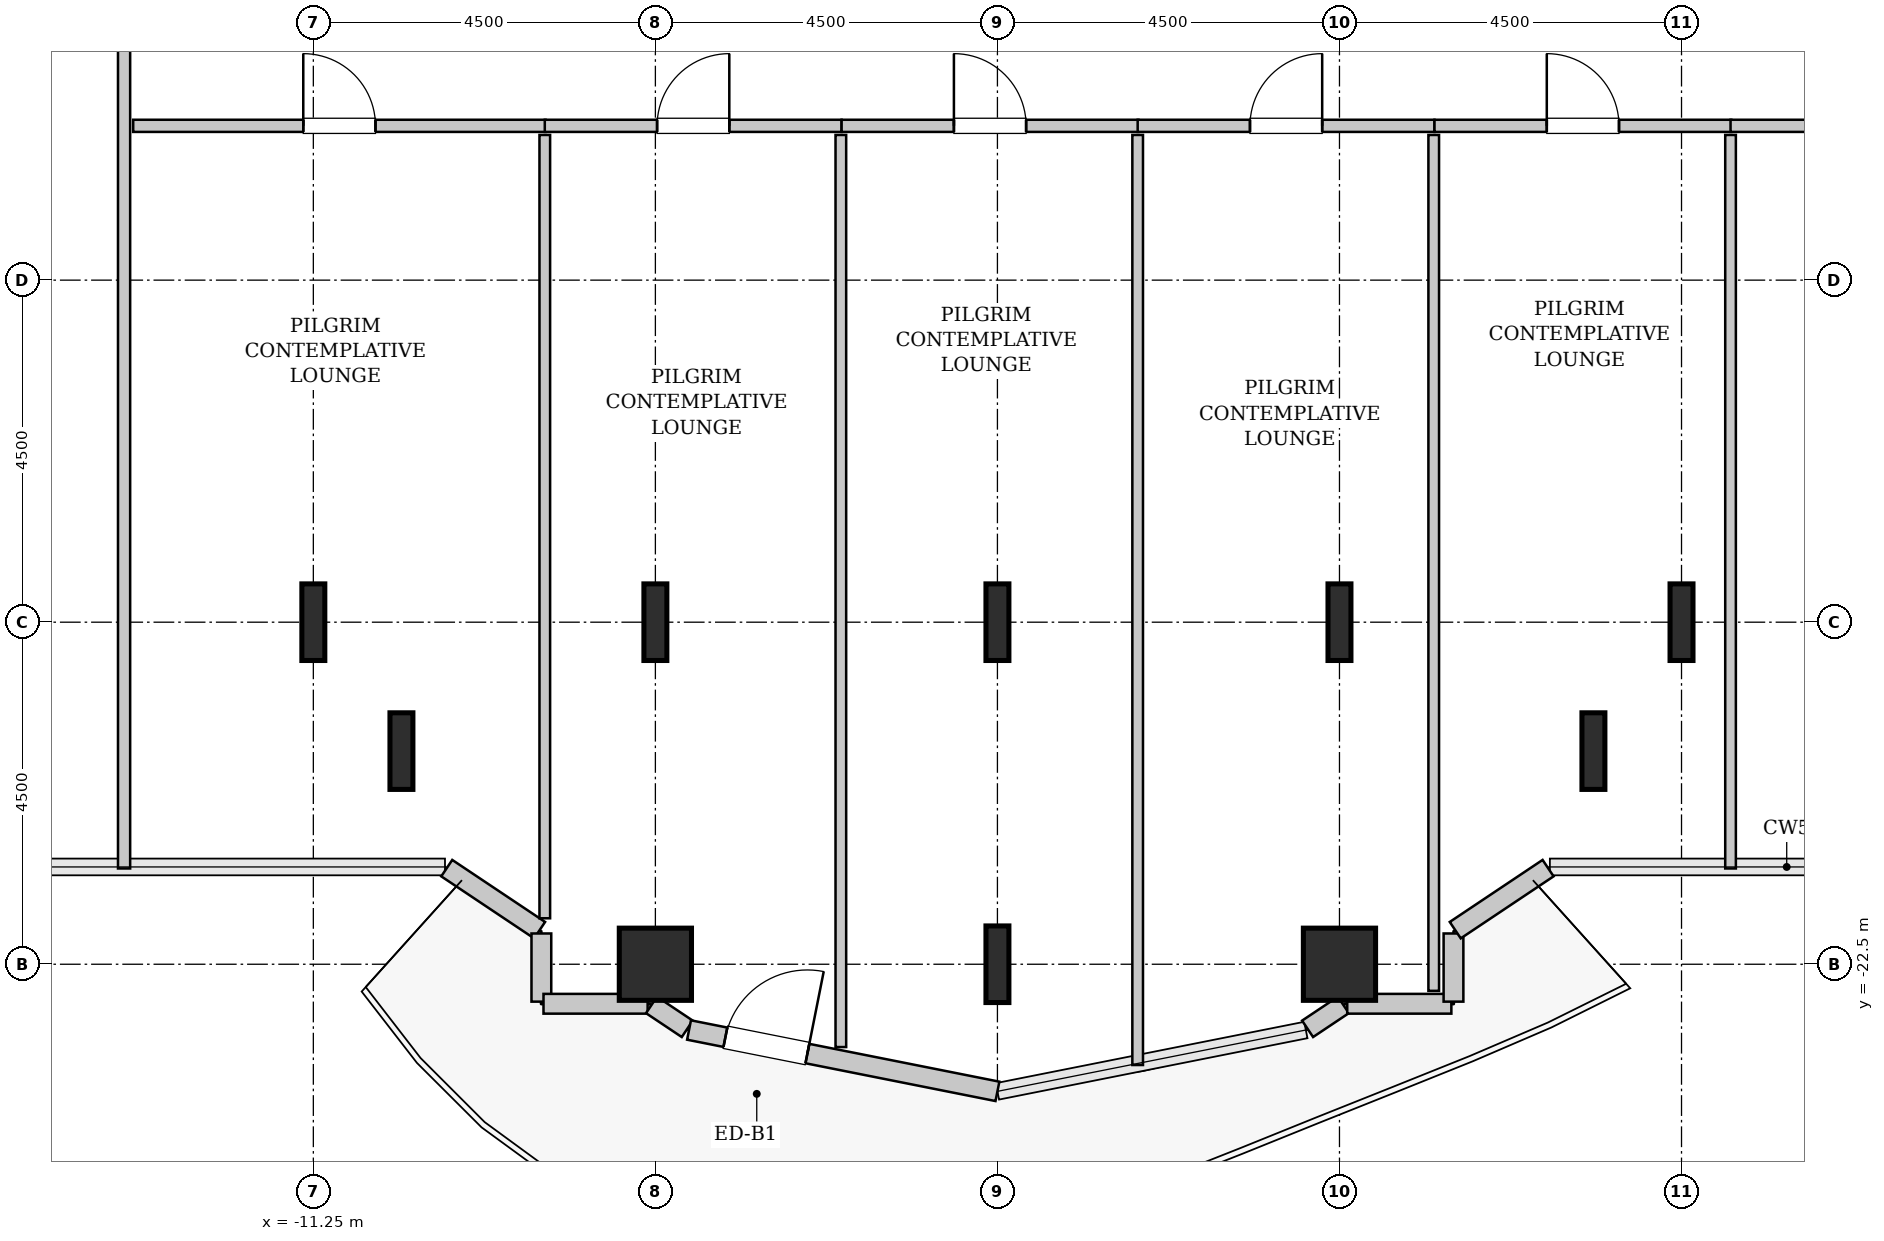
"""IFC4 building model, lengths in metres.
Left out: names, types, materials, properties, quantities, classifications, styles, units other than length and angle.
Written with IfcOpenShell. Run it as: python <this file> out.ifc"""

import sys

from ifc_helpers import new_model, si_unit, direction, frame, frame_2d, origin, origin_2d, place, context, subcontext, project, spatial, rectangle, hollow_rectangle, i_section, extrude, source, transform, mapped, element, fill, save


model = new_model("IFC4")
c1 = context("Model", 3, precision=1e-05, world=origin(), true_north=direction((0.0, 1.0)))
c2 = subcontext(c1, "Body", "Model", "MODEL_VIEW")
j1 = project(units=[si_unit("LENGTHUNIT", "METRE"), si_unit("PLANEANGLEUNIT", "RADIAN")], contexts=[c1])
p1 = place(None, origin())
s1 = spatial("IfcSite", under=j1, at=p1, CompositionType="ELEMENT")
p2 = place(p1, origin())
s2 = spatial("IfcBuilding", under=s1, at=p2, CompositionType="ELEMENT")
p3 = place(p2, frame((0.0, 0.0, 90.8)))
s3 = spatial("IfcBuildingStorey", under=s2, at=p3, CompositionType="ELEMENT", Elevation=90.8)
m1 = source(origin(), c2, "Body", "SweptSolid", [
    extrude(i_section(OverallWidth=0.302, OverallDepth=1.008, WebThickness=0.021, FlangeThickness=0.04, FilletRadius=0.03, at=origin_2d()), origin(), (0.0, 0.0, 1.0), 3.8),
])
for number, where, z_axis, x_axis in (
    (1, (-11.25, -18.0, 0.0), (0.0, 0.0, 1.0), (1.0, 0.0, 0.0)),
    (2, (-10.091, -19.696, 0.0), (0.0, 0.0, 1.0), (1.0, 0.0, 0.0)),
):
    element("IfcColumn", number, at=place(p3, frame(where, z_axis=z_axis, x_axis=x_axis)), inside=s3, PredefinedType="COLUMN", context=c2, shape_type="MappedRepresentation", body=[
        mapped(m1, transform((0.0, 0.0, 0.0), x_axis=(1.0, 0.0, 0.0), y_axis=(0.0, 1.0, 0.0), z_axis=(0.0, 0.0, 1.0), scale=1.0)),
    ])
m2 = source(origin(), c2, "Body", "SweptSolid", [
    extrude(hollow_rectangle(XDim=0.95, YDim=0.95, WallThickness=0.045, InnerFilletRadius=0.045, OuterFilletRadius=0.09, at=origin_2d()), origin(), (0.0, 0.0, 1.0), 3.8),
])
p4 = place(p3, frame((-6.75, -22.5, 0.0), z_axis=(0.0, 0.0, 1.0), x_axis=(1.0, 0.0, 0.0)))
e3 = element("IfcColumn", 3, at=p4, inside=s3, PredefinedType="COLUMN", context=c2, shape_type="MappedRepresentation", body=[
    mapped(m2, transform((0.0, 0.0, 0.0), x_axis=(1.0, 0.0, 0.0), y_axis=(0.0, 1.0, 0.0), z_axis=(0.0, 0.0, 1.0), scale=1.0)),
])
for number, where, z_axis, x_axis in (
    (4, (-6.75, -18.0, 0.0), (0.0, 0.0, 1.0), (1.0, 0.0, 0.0)),
    (5, (-2.25, -22.5, 0.0), (0.0, 0.0, 1.0), (1.0, 0.0, 0.0)),
    (6, (-2.25, -18.0, 0.0), (0.0, 0.0, 1.0), (1.0, 0.0, 0.0)),
):
    element("IfcColumn", number, at=place(p3, frame(where, z_axis=z_axis, x_axis=x_axis)), inside=s3, PredefinedType="COLUMN", context=c2, shape_type="MappedRepresentation", body=[
        mapped(m1, transform((0.0, 0.0, 0.0), x_axis=(1.0, 0.0, 0.0), y_axis=(0.0, 1.0, 0.0), z_axis=(0.0, 0.0, 1.0), scale=1.0)),
    ])
p5 = place(p3, frame((2.25, -22.5, 0.0), z_axis=(0.0, 0.0, 1.0), x_axis=(1.0, 0.0, 0.0)))
e7 = element("IfcColumn", 7, at=p5, inside=s3, PredefinedType="COLUMN", context=c2, shape_type="MappedRepresentation", body=[
    mapped(m2, transform((0.0, 0.0, 0.0), x_axis=(1.0, 0.0, 0.0), y_axis=(0.0, 1.0, 0.0), z_axis=(0.0, 0.0, 1.0), scale=1.0)),
])
for number, where, z_axis, x_axis in (
    (8, (2.25, -18.0, 0.0), (0.0, 0.0, 1.0), (1.0, 0.0, 0.0)),
    (9, (5.591, -19.696, 0.0), (0.0, 0.0, 1.0), (1.0, 0.0, 0.0)),
    (10, (6.75, -18.0, 0.0), (0.0, 0.0, 1.0), (1.0, 0.0, 0.0)),
):
    element("IfcColumn", number, at=place(p3, frame(where, z_axis=z_axis, x_axis=x_axis)), inside=s3, PredefinedType="COLUMN", context=c2, shape_type="MappedRepresentation", body=[
        mapped(m1, transform((0.0, 0.0, 0.0), x_axis=(1.0, 0.0, 0.0), y_axis=(0.0, 1.0, 0.0), z_axis=(0.0, 0.0, 1.0), scale=1.0)),
    ])
m3 = source(origin(), c2, "Body", "SweptSolid", [
    extrude(rectangle(XDim=1.469, YDim=0.26, at=frame_2d((0.734, 0.0))), origin(), (0.0, 0.0, 1.0), 3.55),
])
p6 = place(p3, frame((-9.495, -21.236, 0.0), z_axis=(0.0, 0.0, 1.0), x_axis=(0.831461760506, -0.555581983884, 0.0)))
e11 = element("IfcWall", 11, at=p6, inside=s3, PredefinedType="SOLIDWALL", context=c2, shape_type="MappedRepresentation", body=[
    mapped(m3, transform((0.0, 0.0, 0.0), x_axis=(1.0, 0.0, 0.0), y_axis=(0.0, 1.0, 0.0), z_axis=(0.0, 0.0, 1.0), scale=1.0)),
])
m4 = source(origin(), c2, "Body", "SweptSolid", [
    extrude(rectangle(XDim=0.897, YDim=0.26, at=frame_2d((0.448, 0.0))), origin(), (0.0, 0.0, 1.0), 3.55),
])
p7 = place(p3, frame((-8.25, -22.095, 0.0), z_axis=(0.0, 0.0, 1.0), x_axis=(0.0, -1.0, 0.0)))
e12 = element("IfcWall", 12, at=p7, inside=s3, PredefinedType="SOLIDWALL", context=c2, shape_type="MappedRepresentation", body=[
    mapped(m4, transform((0.0, 0.0, 0.0), x_axis=(1.0, 0.0, 0.0), y_axis=(0.0, 1.0, 0.0), z_axis=(0.0, 0.0, 1.0), scale=1.0)),
])
m5 = source(origin(), c2, "Body", "SweptSolid", [
    extrude(rectangle(XDim=1.37, YDim=0.26, at=frame_2d((0.685, 0.0))), origin(), (0.0, 0.0, 1.0), 3.55),
])
p8 = place(p3, frame((-8.222, -23.02, 0.0), z_axis=(0.0, 0.0, 1.0), x_axis=(1.0, 0.0, 0.0)))
e13 = element("IfcWall", 13, at=p8, inside=s3, PredefinedType="SOLIDWALL", context=c2, shape_type="MappedRepresentation", body=[
    mapped(m5, transform((0.0, 0.0, 0.0), x_axis=(1.0, 0.0, 0.0), y_axis=(0.0, 1.0, 0.0), z_axis=(0.0, 0.0, 1.0), scale=1.0)),
])
m6 = source(origin(), c2, "Body", "SweptSolid", [
    extrude(rectangle(XDim=0.565, YDim=0.26, at=frame_2d((0.283, 0.0))), origin(), (0.0, 0.0, 1.0), 3.55),
])
p9 = place(p3, frame((-6.801, -23.036, 0.0), z_axis=(0.0, 0.0, 1.0), x_axis=(0.831651492666, -0.555297933317, 0.0)))
e14 = element("IfcWall", 14, at=p9, inside=s3, PredefinedType="SOLIDWALL", context=c2, shape_type="MappedRepresentation", body=[
    mapped(m6, transform((0.0, 0.0, 0.0), x_axis=(1.0, 0.0, 0.0), y_axis=(0.0, 1.0, 0.0), z_axis=(0.0, 0.0, 1.0), scale=1.0)),
])
m7 = source(origin(), c2, "Body", "SweptSolid", [
    extrude(rectangle(XDim=4.137, YDim=0.26, at=frame_2d((2.068, 0.0))), origin(), (0.0, 0.0, 1.0), 3.55),
])
p10 = place(p3, frame((-6.307, -23.365, 0.0), z_axis=(0.0, 0.0, 1.0), x_axis=(0.980782170794, -0.195105954428, 0.0)))
e15 = element("IfcWall", 15, at=p10, inside=s3, PredefinedType="SOLIDWALL", context=c2, shape_type="MappedRepresentation", body=[
    mapped(m7, transform((0.0, 0.0, 0.0), x_axis=(1.0, 0.0, 0.0), y_axis=(0.0, 1.0, 0.0), z_axis=(0.0, 0.0, 1.0), scale=1.0)),
])
p11 = place(p10, frame((0.488, 0.0, 0.0)))
e16 = element("IfcOpeningElement", 16, at=p11, cuts=e15, PredefinedType="OPENING", context=c2, shape_type="SweptSolid", body=[
    extrude(rectangle(XDim=1.1, YDim=2.2, at=frame_2d((0.55, 1.1))), frame((0.0, 0.14, 0.0), z_axis=(0.0, -1.0, 0.0), x_axis=(1.0, 0.0, 0.0)), (0.0, 0.0, 1.0), 0.28),
])
p12 = place(p3, frame((1.831, -23.35, 0.0), z_axis=(0.0, 0.0, 1.0), x_axis=(0.831651492666, 0.555297933317, 0.0)))
e17 = element("IfcWall", 17, at=p12, inside=s3, PredefinedType="SOLIDWALL", context=c2, shape_type="MappedRepresentation", body=[
    mapped(m6, transform((0.0, 0.0, 0.0), x_axis=(1.0, 0.0, 0.0), y_axis=(0.0, 1.0, 0.0), z_axis=(0.0, 0.0, 1.0), scale=1.0)),
])
p13 = place(p3, frame((2.352, -23.02, 0.0), z_axis=(0.0, 0.0, 1.0), x_axis=(1.0, 0.0, 0.0)))
e18 = element("IfcWall", 18, at=p13, inside=s3, PredefinedType="SOLIDWALL", context=c2, shape_type="MappedRepresentation", body=[
    mapped(m5, transform((0.0, 0.0, 0.0), x_axis=(1.0, 0.0, 0.0), y_axis=(0.0, 1.0, 0.0), z_axis=(0.0, 0.0, 1.0), scale=1.0)),
])
p14 = place(p3, frame((3.75, -22.992, 0.0), z_axis=(0.0, 0.0, 1.0), x_axis=(0.0, 1.0, 0.0)))
e19 = element("IfcWall", 19, at=p14, inside=s3, PredefinedType="SOLIDWALL", context=c2, shape_type="MappedRepresentation", body=[
    mapped(m4, transform((0.0, 0.0, 0.0), x_axis=(1.0, 0.0, 0.0), y_axis=(0.0, 1.0, 0.0), z_axis=(0.0, 0.0, 1.0), scale=1.0)),
])
p15 = place(p3, frame((3.773, -22.052, 0.0), z_axis=(0.0, 0.0, 1.0), x_axis=(0.831461760506, 0.555581983884, 0.0)))
e20 = element("IfcWall", 20, at=p15, inside=s3, PredefinedType="SOLIDWALL", context=c2, shape_type="MappedRepresentation", body=[
    mapped(m3, transform((0.0, 0.0, 0.0), x_axis=(1.0, 0.0, 0.0), y_axis=(0.0, 1.0, 0.0), z_axis=(0.0, 0.0, 1.0), scale=1.0)),
])
m8 = source(origin(), c2, "Body", "SweptSolid", [
    extrude(rectangle(XDim=12.845, YDim=0.16, at=frame_2d((6.422, 0.0))), origin(), (0.0, 0.0, 1.0), 3.535),
])
p16 = place(p3, frame((-13.74, -21.24, 0.0), z_axis=(0.0, 0.0, 1.0), x_axis=(0.0, 1.0, 0.0)))
e21 = element("IfcWall", 21, at=p16, inside=s3, PredefinedType="PARTITIONING", context=c2, shape_type="MappedRepresentation", body=[
    mapped(m8, transform((0.0, 0.0, 0.0), x_axis=(1.0, 0.0, 0.0), y_axis=(0.0, 1.0, 0.0), z_axis=(0.0, 0.0, 1.0), scale=1.0)),
])
p17 = place(p16, frame((10.812, 0.0, 0.0)))
e22 = element("IfcOpeningElement", 22, at=p17, cuts=e21, PredefinedType="OPENING", context=c2, shape_type="SweptSolid", body=[
    extrude(rectangle(XDim=0.95, YDim=2.1, at=frame_2d((0.475, 1.05))), frame((0.0, 0.09, 0.0), z_axis=(0.0, -1.0, 0.0), x_axis=(1.0, 0.0, 0.0)), (0.0, 0.0, 1.0), 0.18),
])
m9 = source(origin(), c2, "Body", "SweptSolid", [
    extrude(rectangle(XDim=5.425, YDim=0.16, at=frame_2d((2.712, 0.0))), origin(), (0.0, 0.0, 1.0), 3.535),
])
p18 = place(p3, frame((-13.62, -11.47, 0.0), z_axis=(0.0, 0.0, 1.0), x_axis=(1.0, 0.0, 0.0)))
e23 = element("IfcWall", 23, at=p18, inside=s3, PredefinedType="PARTITIONING", context=c2, shape_type="MappedRepresentation", body=[
    mapped(m9, transform((0.0, 0.0, 0.0), x_axis=(1.0, 0.0, 0.0), y_axis=(0.0, 1.0, 0.0), z_axis=(0.0, 0.0, 1.0), scale=1.0)),
])
p19 = place(p18, frame((2.238, 0.0, 0.0)))
e24 = element("IfcOpeningElement", 24, at=p19, cuts=e23, PredefinedType="OPENING", context=c2, shape_type="SweptSolid", body=[
    extrude(rectangle(XDim=0.95, YDim=2.1, at=frame_2d((0.475, 1.05))), frame((0.0, 0.09, 0.0), z_axis=(0.0, -1.0, 0.0), x_axis=(1.0, 0.0, 0.0)), (0.0, 0.0, 1.0), 0.18),
])
m10 = source(origin(), c2, "Body", "SweptSolid", [
    extrude(rectangle(XDim=10.305, YDim=0.14, at=frame_2d((5.153, 0.0))), origin(), (0.0, 0.0, 1.0), 3.535),
])
p20 = place(p3, frame((-8.205, -21.895, 0.0), z_axis=(0.0, 0.0, 1.0), x_axis=(0.0, 1.0, 0.0)))
e25 = element("IfcWall", 25, at=p20, inside=s3, PredefinedType="PARTITIONING", context=c2, shape_type="MappedRepresentation", body=[
    mapped(m10, transform((0.0, 0.0, 0.0), x_axis=(1.0, 0.0, 0.0), y_axis=(0.0, 1.0, 0.0), z_axis=(0.0, 0.0, 1.0), scale=1.0)),
])
m11 = source(origin(), c2, "Body", "SweptSolid", [
    extrude(rectangle(XDim=3.905, YDim=0.16, at=frame_2d((1.953, 0.0))), origin(), (0.0, 0.0, 1.0), 3.535),
])
p21 = place(p3, frame((-8.205, -11.47, 0.0), z_axis=(0.0, 0.0, 1.0), x_axis=(1.0, 0.0, 0.0)))
e26 = element("IfcWall", 26, at=p21, inside=s3, PredefinedType="PARTITIONING", context=c2, shape_type="MappedRepresentation", body=[
    mapped(m11, transform((0.0, 0.0, 0.0), x_axis=(1.0, 0.0, 0.0), y_axis=(0.0, 1.0, 0.0), z_axis=(0.0, 0.0, 1.0), scale=1.0)),
])
p22 = place(p21, frame((1.478, 0.0, 0.0)))
e27 = element("IfcOpeningElement", 27, at=p22, cuts=e26, PredefinedType="OPENING", context=c2, shape_type="SweptSolid", body=[
    extrude(rectangle(XDim=0.95, YDim=2.1, at=frame_2d((0.475, 1.05))), frame((0.0, 0.09, 0.0), z_axis=(0.0, -1.0, 0.0), x_axis=(1.0, 0.0, 0.0)), (0.0, 0.0, 1.0), 0.18),
])
m12 = source(origin(), c2, "Body", "SweptSolid", [
    extrude(rectangle(XDim=12.0, YDim=0.14, at=frame_2d((6.0, 0.0))), origin(), (0.0, 0.0, 1.0), 3.535),
])
p23 = place(p3, frame((-4.31, -23.59, 0.0), z_axis=(0.0, 0.0, 1.0), x_axis=(0.0, 1.0, 0.0)))
e28 = element("IfcWall", 28, at=p23, inside=s3, PredefinedType="PARTITIONING", context=c2, shape_type="MappedRepresentation", body=[
    mapped(m12, transform((0.0, 0.0, 0.0), x_axis=(1.0, 0.0, 0.0), y_axis=(0.0, 1.0, 0.0), z_axis=(0.0, 0.0, 1.0), scale=1.0)),
])
p24 = place(p3, frame((-4.3, -11.47, 0.0), z_axis=(0.0, 0.0, 1.0), x_axis=(1.0, 0.0, 0.0)))
e29 = element("IfcWall", 29, at=p24, inside=s3, PredefinedType="PARTITIONING", context=c2, shape_type="MappedRepresentation", body=[
    mapped(m11, transform((0.0, 0.0, 0.0), x_axis=(1.0, 0.0, 0.0), y_axis=(0.0, 1.0, 0.0), z_axis=(0.0, 0.0, 1.0), scale=1.0)),
])
p25 = place(p24, frame((1.478, 0.0, 0.0)))
e30 = element("IfcOpeningElement", 30, at=p25, cuts=e29, PredefinedType="OPENING", context=c2, shape_type="SweptSolid", body=[
    extrude(rectangle(XDim=0.95, YDim=2.1, at=frame_2d((0.475, 1.05))), frame((0.0, 0.09, 0.0), z_axis=(0.0, -1.0, 0.0), x_axis=(1.0, 0.0, 0.0)), (0.0, 0.0, 1.0), 0.18),
])
m13 = source(origin(), c2, "Body", "SweptSolid", [
    extrude(rectangle(XDim=12.236, YDim=0.14, at=frame_2d((6.118, 0.0))), origin(), (0.0, 0.0, 1.0), 3.535),
])
p26 = place(p3, frame((-0.405, -23.826, 0.0), z_axis=(0.0, 0.0, 1.0), x_axis=(0.0, 1.0, 0.0)))
e31 = element("IfcWall", 31, at=p26, inside=s3, PredefinedType="PARTITIONING", context=c2, shape_type="MappedRepresentation", body=[
    mapped(m13, transform((0.0, 0.0, 0.0), x_axis=(1.0, 0.0, 0.0), y_axis=(0.0, 1.0, 0.0), z_axis=(0.0, 0.0, 1.0), scale=1.0)),
])
p27 = place(p3, frame((-0.405, -11.47, 0.0), z_axis=(0.0, 0.0, 1.0), x_axis=(1.0, 0.0, 0.0)))
e32 = element("IfcWall", 32, at=p27, inside=s3, PredefinedType="PARTITIONING", context=c2, shape_type="MappedRepresentation", body=[
    mapped(m11, transform((0.0, 0.0, 0.0), x_axis=(1.0, 0.0, 0.0), y_axis=(0.0, 1.0, 0.0), z_axis=(0.0, 0.0, 1.0), scale=1.0)),
])
p28 = place(p27, frame((1.478, 0.0, 0.0)))
e33 = element("IfcOpeningElement", 33, at=p28, cuts=e32, PredefinedType="OPENING", context=c2, shape_type="SweptSolid", body=[
    extrude(rectangle(XDim=0.95, YDim=2.1, at=frame_2d((0.475, 1.05))), frame((0.0, 0.09, 0.0), z_axis=(0.0, -1.0, 0.0), x_axis=(1.0, 0.0, 0.0)), (0.0, 0.0, 1.0), 0.18),
])
m14 = source(origin(), c2, "Body", "SweptSolid", [
    extrude(rectangle(XDim=11.26, YDim=0.14, at=frame_2d((5.63, 0.0))), origin(), (0.0, 0.0, 1.0), 3.535),
])
p29 = place(p3, frame((3.49, -22.85, 0.0), z_axis=(0.0, 0.0, 1.0), x_axis=(0.0, 1.0, 0.0)))
e34 = element("IfcWall", 34, at=p29, inside=s3, PredefinedType="PARTITIONING", context=c2, shape_type="MappedRepresentation", body=[
    mapped(m14, transform((0.0, 0.0, 0.0), x_axis=(1.0, 0.0, 0.0), y_axis=(0.0, 1.0, 0.0), z_axis=(0.0, 0.0, 1.0), scale=1.0)),
])
p30 = place(p3, frame((3.5, -11.47, 0.0), z_axis=(0.0, 0.0, 1.0), x_axis=(1.0, 0.0, 0.0)))
e35 = element("IfcWall", 35, at=p30, inside=s3, PredefinedType="PARTITIONING", context=c2, shape_type="MappedRepresentation", body=[
    mapped(m11, transform((0.0, 0.0, 0.0), x_axis=(1.0, 0.0, 0.0), y_axis=(0.0, 1.0, 0.0), z_axis=(0.0, 0.0, 1.0), scale=1.0)),
])
p31 = place(p30, frame((1.478, 0.0, 0.0)))
e36 = element("IfcOpeningElement", 36, at=p31, cuts=e35, PredefinedType="OPENING", context=c2, shape_type="SweptSolid", body=[
    extrude(rectangle(XDim=0.95, YDim=2.1, at=frame_2d((0.475, 1.05))), frame((0.0, 0.09, 0.0), z_axis=(0.0, -1.0, 0.0), x_axis=(1.0, 0.0, 0.0)), (0.0, 0.0, 1.0), 0.18),
])
m15 = source(origin(), c2, "Body", "SweptSolid", [
    extrude(rectangle(XDim=9.65, YDim=0.14, at=frame_2d((4.825, 0.0))), origin(), (0.0, 0.0, 1.0), 3.535),
])
p32 = place(p3, frame((7.395, -21.24, 0.0), z_axis=(0.0, 0.0, 1.0), x_axis=(0.0, 1.0, 0.0)))
e37 = element("IfcWall", 37, at=p32, inside=s3, PredefinedType="PARTITIONING", context=c2, shape_type="MappedRepresentation", body=[
    mapped(m15, transform((0.0, 0.0, 0.0), x_axis=(1.0, 0.0, 0.0), y_axis=(0.0, 1.0, 0.0), z_axis=(0.0, 0.0, 1.0), scale=1.0)),
])
m16 = source(origin(), c2, "Body", "SweptSolid", [
    extrude(rectangle(XDim=6.225, YDim=0.16, at=frame_2d((3.113, 0.0))), origin(), (0.0, 0.0, 1.0), 3.535),
])
p33 = place(p3, frame((7.395, -11.47, 0.0), z_axis=(0.0, 0.0, 1.0), x_axis=(1.0, 0.0, 0.0)))
e38 = element("IfcWall", 38, at=p33, inside=s3, PredefinedType="PARTITIONING", context=c2, shape_type="MappedRepresentation", body=[
    mapped(m16, transform((0.0, 0.0, 0.0), x_axis=(1.0, 0.0, 0.0), y_axis=(0.0, 1.0, 0.0), z_axis=(0.0, 0.0, 1.0), scale=1.0)),
])
p34 = place(p33, frame((2.637, 0.0, 0.0)))
e39 = element("IfcOpeningElement", 39, at=p34, cuts=e38, PredefinedType="OPENING", context=c2, shape_type="SweptSolid", body=[
    extrude(rectangle(XDim=0.95, YDim=2.1, at=frame_2d((0.475, 1.05))), frame((0.0, 0.09, 0.0), z_axis=(0.0, -1.0, 0.0), x_axis=(1.0, 0.0, 0.0)), (0.0, 0.0, 1.0), 0.18),
])
m17 = source(origin(), c2, "Body", "SweptSolid", [
    extrude(rectangle(XDim=1.1, YDim=2.2, at=frame_2d((0.55, 1.1))), frame((0.0, 0.025, 0.0), z_axis=(0.0, -1.0, 0.0), x_axis=(1.0, 0.0, 0.0)), (0.0, 0.0, 1.0), 0.05),
])
p35 = place(p11, origin())
e40 = element("IfcDoor", 40, at=p35, inside=s3, OperationType="SINGLE_SWING_RIGHT", PredefinedType="DOOR", context=c2, shape_type="MappedRepresentation", body=[
    mapped(m17, transform((0.0, 0.0, 0.0), x_axis=(1.0, 0.0, 0.0), y_axis=(0.0, 1.0, 0.0), z_axis=(0.0, 0.0, 1.0), scale=1.0)),
])
fill(e16, e40)
m18 = source(origin(), c2, "Body", "SweptSolid", [
    extrude(rectangle(XDim=0.95, YDim=2.1, at=frame_2d((0.475, 1.05))), frame((0.0, 0.025, 0.0), z_axis=(0.0, -1.0, 0.0), x_axis=(1.0, 0.0, 0.0)), (0.0, 0.0, 1.0), 0.05),
])
p36 = place(p19, origin())
e41 = element("IfcDoor", 41, at=p36, inside=s3, OperationType="SINGLE_SWING_LEFT", PredefinedType="DOOR", context=c2, shape_type="MappedRepresentation", body=[
    mapped(m18, transform((0.0, 0.0, 0.0), x_axis=(1.0, 0.0, 0.0), y_axis=(0.0, 1.0, 0.0), z_axis=(0.0, 0.0, 1.0), scale=1.0)),
])
fill(e24, e41)
p37 = place(p22, origin())
e42 = element("IfcDoor", 42, at=p37, inside=s3, OperationType="SINGLE_SWING_RIGHT", PredefinedType="DOOR", context=c2, shape_type="MappedRepresentation", body=[
    mapped(m18, transform((0.0, 0.0, 0.0), x_axis=(1.0, 0.0, 0.0), y_axis=(0.0, 1.0, 0.0), z_axis=(0.0, 0.0, 1.0), scale=1.0)),
])
fill(e27, e42)
p38 = place(p25, origin())
e43 = element("IfcDoor", 43, at=p38, inside=s3, OperationType="SINGLE_SWING_LEFT", PredefinedType="DOOR", context=c2, shape_type="MappedRepresentation", body=[
    mapped(m18, transform((0.0, 0.0, 0.0), x_axis=(1.0, 0.0, 0.0), y_axis=(0.0, 1.0, 0.0), z_axis=(0.0, 0.0, 1.0), scale=1.0)),
])
fill(e30, e43)
p39 = place(p28, origin())
e44 = element("IfcDoor", 44, at=p39, inside=s3, OperationType="SINGLE_SWING_RIGHT", PredefinedType="DOOR", context=c2, shape_type="MappedRepresentation", body=[
    mapped(m18, transform((0.0, 0.0, 0.0), x_axis=(1.0, 0.0, 0.0), y_axis=(0.0, 1.0, 0.0), z_axis=(0.0, 0.0, 1.0), scale=1.0)),
])
fill(e33, e44)
p40 = place(p31, origin())
e45 = element("IfcDoor", 45, at=p40, inside=s3, OperationType="SINGLE_SWING_LEFT", PredefinedType="DOOR", context=c2, shape_type="MappedRepresentation", body=[
    mapped(m18, transform((0.0, 0.0, 0.0), x_axis=(1.0, 0.0, 0.0), y_axis=(0.0, 1.0, 0.0), z_axis=(0.0, 0.0, 1.0), scale=1.0)),
])
fill(e36, e45)
save(model, sys.argv[1])
